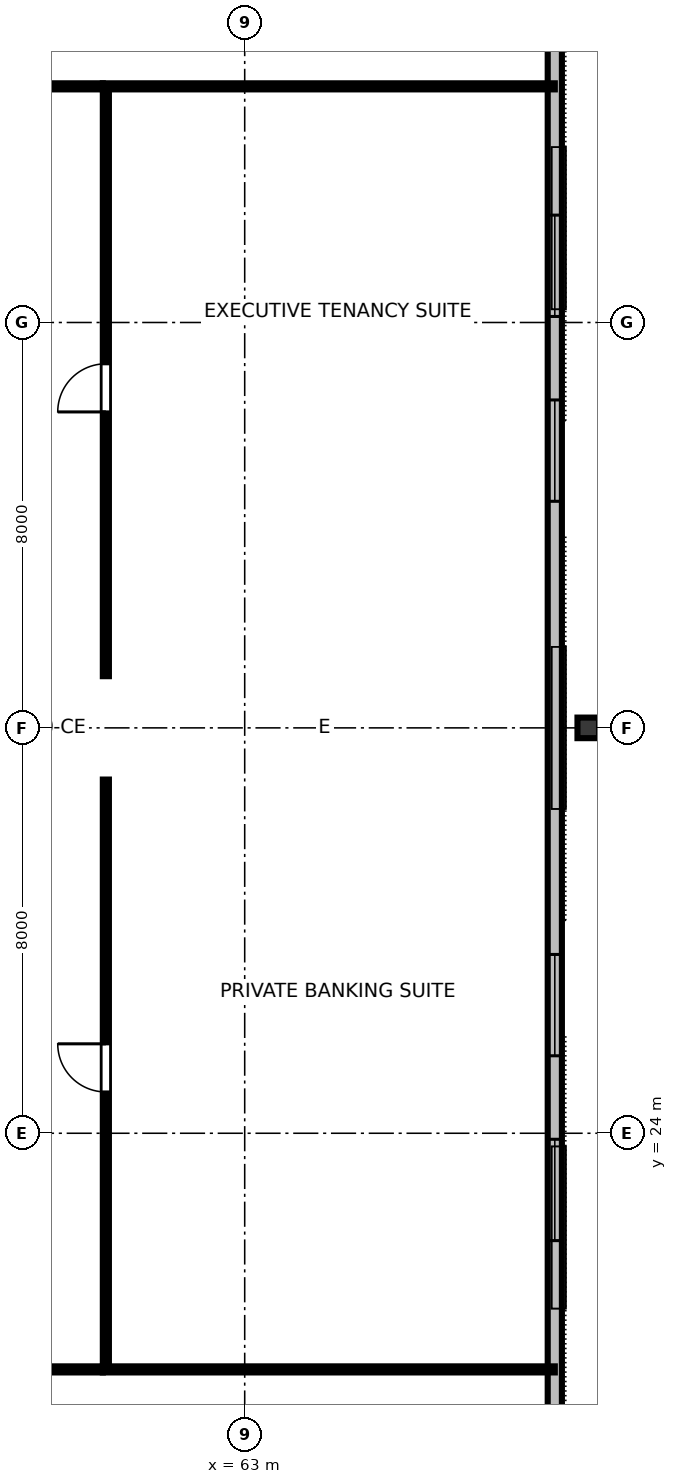
"""IFC4 building model, lengths in metres.
Left out: names, types, materials, properties, quantities, classifications, styles, units other than length and angle.
Written with IfcOpenShell. Run it as: python <this file> out.ifc"""

import sys

from ifc_helpers import new_model, si_unit, direction, frame, frame_2d, origin, origin_2d, place, context, subcontext, project, spatial, rectangle, i_section, extrude, element, fill, save


model = new_model("IFC4")
c1 = context("Model", 3, precision=1e-05, world=origin(), true_north=direction((0.0, 1.0)))
c2 = subcontext(c1, "Body", "Model", "MODEL_VIEW")
j1 = project(units=[si_unit("LENGTHUNIT", "METRE"), si_unit("PLANEANGLEUNIT", "RADIAN")], contexts=[c1])
p1 = place(None, origin())
s1 = spatial("IfcSite", under=j1, at=p1, CompositionType="ELEMENT")
p2 = place(p1, origin())
s2 = spatial("IfcBuilding", under=s1, at=p2, CompositionType="ELEMENT")
p3 = place(p2, frame((0.0, 0.0, 152.8)))
s3 = spatial("IfcBuildingStorey", under=s2, at=p3, CompositionType="ELEMENT", Elevation=152.8)
p4 = place(p3, frame((69.78, 32.0, 0.0), z_axis=(0.0, 0.0, 1.0), x_axis=(0.0, 1.0, 0.0)))
e1 = element("IfcColumn", 1, at=p4, inside=s3, PredefinedType="COLUMN", context=c2, shape_type="SweptSolid", body=[
    extrude(i_section(OverallWidth=0.406, OverallDepth=0.425, WebThickness=0.033, FlangeThickness=0.052, FilletRadius=0.025, at=origin_2d()), origin(), (0.0, 0.0, 1.0), 3.358),
])
p5 = place(p3, frame((69.12, 16.31, 0.0), z_axis=(0.0, 0.0, 1.0), x_axis=(0.0, 1.0, 0.0)))
e2 = element("IfcWall", 2, at=p5, inside=s3, PredefinedType="STANDARD", context=c2, shape_type="SweptSolid", body=[
    extrude(rectangle(XDim=31.38, YDim=0.28, at=frame_2d((15.69, 0.0))), origin(), (0.0, 0.0, 1.0), 3.36),
])
p6 = place(p5, frame((5.571, 0.0, 0.8)))
e3 = element("IfcOpeningElement", 3, at=p6, cuts=e2, PredefinedType="OPENING", context=c2, shape_type="SweptSolid", body=[
    extrude(rectangle(XDim=2.0, YDim=1.95, at=frame_2d((1.0, 0.975))), frame((0.0, 0.15, 0.0), z_axis=(0.0, -1.0, 0.0), x_axis=(1.0, 0.0, 0.0)), (0.0, 0.0, 1.0), 0.3),
])
p7 = place(p5, frame((9.219, 0.0, 0.8)))
e4 = element("IfcOpeningElement", 4, at=p7, cuts=e2, PredefinedType="OPENING", context=c2, shape_type="SweptSolid", body=[
    extrude(rectangle(XDim=2.0, YDim=1.95, at=frame_2d((1.0, 0.975))), frame((0.0, 0.15, 0.0), z_axis=(0.0, -1.0, 0.0), x_axis=(1.0, 0.0, 0.0)), (0.0, 0.0, 1.0), 0.3),
])
p8 = place(p5, frame((20.161, 0.0, 0.8)))
e5 = element("IfcOpeningElement", 5, at=p8, cuts=e2, PredefinedType="OPENING", context=c2, shape_type="SweptSolid", body=[
    extrude(rectangle(XDim=2.0, YDim=1.95, at=frame_2d((1.0, 0.975))), frame((0.0, 0.15, 0.0), z_axis=(0.0, -1.0, 0.0), x_axis=(1.0, 0.0, 0.0)), (0.0, 0.0, 1.0), 0.3),
])
p9 = place(p5, frame((23.809, 0.0, 0.8)))
e6 = element("IfcOpeningElement", 6, at=p9, cuts=e2, PredefinedType="OPENING", context=c2, shape_type="SweptSolid", body=[
    extrude(rectangle(XDim=2.0, YDim=1.95, at=frame_2d((1.0, 0.975))), frame((0.0, 0.15, 0.0), z_axis=(0.0, -1.0, 0.0), x_axis=(1.0, 0.0, 0.0)), (0.0, 0.0, 1.0), 0.3),
])
p10 = place(p3, frame((31.8, 19.34, 0.0), z_axis=(0.0, 0.0, 1.0), x_axis=(1.0, 0.0, 0.0)))
e7 = element("IfcWall", 7, at=p10, inside=s3, PredefinedType="PARTITIONING", context=c2, shape_type="SweptSolid", body=[
    extrude(rectangle(XDim=28.4, YDim=0.12, at=frame_2d((14.2, 0.0))), origin(), (0.0, 0.0, 1.0), 2.64),
])
p11 = place(p10, frame((4.789, 0.0, 0.0)))
e8 = element("IfcOpeningElement", 8, at=p11, cuts=e7, PredefinedType="OPENING", context=c2, shape_type="SweptSolid", body=[
    extrude(rectangle(XDim=0.95, YDim=2.15, at=frame_2d((0.475, 1.075))), frame((0.0, 0.07, 0.0), z_axis=(0.0, -1.0, 0.0), x_axis=(1.0, 0.0, 0.0)), (0.0, 0.0, 1.0), 0.14),
])
p12 = place(p10, frame((12.708, 0.0, 0.0)))
e9 = element("IfcOpeningElement", 9, at=p12, cuts=e7, PredefinedType="OPENING", context=c2, shape_type="SweptSolid", body=[
    extrude(rectangle(XDim=0.95, YDim=2.15, at=frame_2d((0.475, 1.075))), frame((0.0, 0.07, 0.0), z_axis=(0.0, -1.0, 0.0), x_axis=(1.0, 0.0, 0.0)), (0.0, 0.0, 1.0), 0.14),
])
p13 = place(p10, frame((21.645, 0.0, 0.0)))
e10 = element("IfcOpeningElement", 10, at=p13, cuts=e7, PredefinedType="OPENING", context=c2, shape_type="SweptSolid", body=[
    extrude(rectangle(XDim=0.95, YDim=2.15, at=frame_2d((0.475, 1.075))), frame((0.0, 0.07, 0.0), z_axis=(0.0, -1.0, 0.0), x_axis=(1.0, 0.0, 0.0)), (0.0, 0.0, 1.0), 0.14),
])
p14 = place(p3, frame((31.8, 44.66, 0.0), z_axis=(0.0, 0.0, 1.0), x_axis=(1.0, 0.0, 0.0)))
e11 = element("IfcWall", 11, at=p14, inside=s3, PredefinedType="PARTITIONING", context=c2, shape_type="SweptSolid", body=[
    extrude(rectangle(XDim=28.4, YDim=0.12, at=frame_2d((14.2, 0.0))), origin(), (0.0, 0.0, 1.0), 2.64),
])
p15 = place(p14, frame((4.036, 0.0, 0.0)))
e12 = element("IfcOpeningElement", 12, at=p15, cuts=e11, PredefinedType="OPENING", context=c2, shape_type="SweptSolid", body=[
    extrude(rectangle(XDim=0.95, YDim=2.15, at=frame_2d((0.475, 1.075))), frame((0.0, 0.07, 0.0), z_axis=(0.0, -1.0, 0.0), x_axis=(1.0, 0.0, 0.0)), (0.0, 0.0, 1.0), 0.14),
])
p16 = place(p14, frame((12.256, 0.0, 0.0)))
e13 = element("IfcOpeningElement", 13, at=p16, cuts=e11, PredefinedType="OPENING", context=c2, shape_type="SweptSolid", body=[
    extrude(rectangle(XDim=0.95, YDim=2.15, at=frame_2d((0.475, 1.075))), frame((0.0, 0.07, 0.0), z_axis=(0.0, -1.0, 0.0), x_axis=(1.0, 0.0, 0.0)), (0.0, 0.0, 1.0), 0.14),
])
p17 = place(p14, frame((18.246, 0.0, 0.0)))
e14 = element("IfcOpeningElement", 14, at=p17, cuts=e11, PredefinedType="OPENING", context=c2, shape_type="SweptSolid", body=[
    extrude(rectangle(XDim=0.95, YDim=2.15, at=frame_2d((0.475, 1.075))), frame((0.0, 0.07, 0.0), z_axis=(0.0, -1.0, 0.0), x_axis=(1.0, 0.0, 0.0)), (0.0, 0.0, 1.0), 0.14),
])
p18 = place(p14, frame((24.086, 0.0, 0.0)))
e15 = element("IfcOpeningElement", 15, at=p18, cuts=e11, PredefinedType="OPENING", context=c2, shape_type="SweptSolid", body=[
    extrude(rectangle(XDim=0.95, YDim=2.15, at=frame_2d((0.475, 1.075))), frame((0.0, 0.07, 0.0), z_axis=(0.0, -1.0, 0.0), x_axis=(1.0, 0.0, 0.0)), (0.0, 0.0, 1.0), 0.14),
])
p19 = place(p3, frame((60.26, 19.4, 0.0), z_axis=(0.0, 0.0, 1.0), x_axis=(0.0, 1.0, 0.0)))
e16 = element("IfcWall", 16, at=p19, inside=s3, PredefinedType="PARTITIONING", context=c2, shape_type="SweptSolid", body=[
    extrude(rectangle(XDim=11.58, YDim=0.12, at=frame_2d((5.79, 0.0))), origin(), (0.0, 0.0, 1.0), 2.64),
])
p20 = place(p19, frame((5.415, 0.0, 0.0)))
e17 = element("IfcOpeningElement", 17, at=p20, cuts=e16, PredefinedType="OPENING", context=c2, shape_type="SweptSolid", body=[
    extrude(rectangle(XDim=0.95, YDim=2.15, at=frame_2d((0.475, 1.075))), frame((0.0, 0.07, 0.0), z_axis=(0.0, -1.0, 0.0), x_axis=(1.0, 0.0, 0.0)), (0.0, 0.0, 1.0), 0.14),
])
p21 = place(p3, frame((60.26, 33.02, 0.0), z_axis=(0.0, 0.0, 1.0), x_axis=(0.0, 1.0, 0.0)))
e18 = element("IfcWall", 18, at=p21, inside=s3, PredefinedType="PARTITIONING", context=c2, shape_type="SweptSolid", body=[
    extrude(rectangle(XDim=11.58, YDim=0.12, at=frame_2d((5.79, 0.0))), origin(), (0.0, 0.0, 1.0), 2.64),
])
p22 = place(p21, frame((5.215, 0.0, 0.0)))
e19 = element("IfcOpeningElement", 19, at=p22, cuts=e18, PredefinedType="OPENING", context=c2, shape_type="SweptSolid", body=[
    extrude(rectangle(XDim=0.95, YDim=2.15, at=frame_2d((0.475, 1.075))), frame((0.0, 0.07, 0.0), z_axis=(0.0, -1.0, 0.0), x_axis=(1.0, 0.0, 0.0)), (0.0, 0.0, 1.0), 0.14),
])
for number, where, z_axis, x_axis in (
    (20, (60.2, 19.34, 0.0), (0.0, 0.0, 1.0), (1.0, 0.0, 0.0)),
    (21, (60.2, 44.66, 0.0), (0.0, 0.0, 1.0), (1.0, 0.0, 0.0)),
):
    element("IfcWall", number, at=place(p3, frame(where, z_axis=z_axis, x_axis=x_axis)), inside=s3, PredefinedType="PARTITIONING", context=c2, shape_type="SweptSolid", body=[
        extrude(rectangle(XDim=8.92, YDim=0.12, at=frame_2d((4.46, 0.0))), origin(), (0.0, 0.0, 1.0), 2.64),
    ])
p23 = place(p6, origin())
e22 = element("IfcWindow", 22, at=p23, inside=s3, PartitioningType="SINGLE_PANEL", PredefinedType="WINDOW", context=c2, shape_type="SweptSolid", body=[
    extrude(rectangle(XDim=2.0, YDim=1.95, at=frame_2d((1.0, 0.975))), frame((0.0, 0.03, 0.0), z_axis=(0.0, -1.0, 0.0), x_axis=(1.0, 0.0, 0.0)), (0.0, 0.0, 1.0), 0.06),
])
fill(e3, e22)
p24 = place(p7, origin())
e23 = element("IfcWindow", 23, at=p24, inside=s3, PartitioningType="SINGLE_PANEL", PredefinedType="WINDOW", context=c2, shape_type="SweptSolid", body=[
    extrude(rectangle(XDim=2.0, YDim=1.95, at=frame_2d((1.0, 0.975))), frame((0.0, 0.03, 0.0), z_axis=(0.0, -1.0, 0.0), x_axis=(1.0, 0.0, 0.0)), (0.0, 0.0, 1.0), 0.06),
])
fill(e4, e23)
p25 = place(p8, origin())
e24 = element("IfcWindow", 24, at=p25, inside=s3, PartitioningType="SINGLE_PANEL", PredefinedType="WINDOW", context=c2, shape_type="SweptSolid", body=[
    extrude(rectangle(XDim=2.0, YDim=1.95, at=frame_2d((1.0, 0.975))), frame((0.0, 0.03, 0.0), z_axis=(0.0, -1.0, 0.0), x_axis=(1.0, 0.0, 0.0)), (0.0, 0.0, 1.0), 0.06),
])
fill(e5, e24)
p26 = place(p9, origin())
e25 = element("IfcWindow", 25, at=p26, inside=s3, PartitioningType="SINGLE_PANEL", PredefinedType="WINDOW", context=c2, shape_type="SweptSolid", body=[
    extrude(rectangle(XDim=2.0, YDim=1.95, at=frame_2d((1.0, 0.975))), frame((0.0, 0.03, 0.0), z_axis=(0.0, -1.0, 0.0), x_axis=(1.0, 0.0, 0.0)), (0.0, 0.0, 1.0), 0.06),
])
fill(e6, e25)
p27 = place(p20, origin())
e26 = element("IfcDoor", 26, at=p27, inside=s3, OperationType="SINGLE_SWING_RIGHT", PredefinedType="DOOR", context=c2, shape_type="SweptSolid", body=[
    extrude(rectangle(XDim=0.95, YDim=2.15, at=frame_2d((0.475, 1.075))), frame((0.0, 0.025, 0.0), z_axis=(0.0, -1.0, 0.0), x_axis=(1.0, 0.0, 0.0)), (0.0, 0.0, 1.0), 0.05),
])
fill(e17, e26)
p28 = place(p22, origin())
e27 = element("IfcDoor", 27, at=p28, inside=s3, OperationType="SINGLE_SWING_LEFT", PredefinedType="DOOR", context=c2, shape_type="SweptSolid", body=[
    extrude(rectangle(XDim=0.95, YDim=2.15, at=frame_2d((0.475, 1.075))), frame((0.0, 0.025, 0.0), z_axis=(0.0, -1.0, 0.0), x_axis=(1.0, 0.0, 0.0)), (0.0, 0.0, 1.0), 0.05),
])
fill(e19, e27)
save(model, sys.argv[1])
